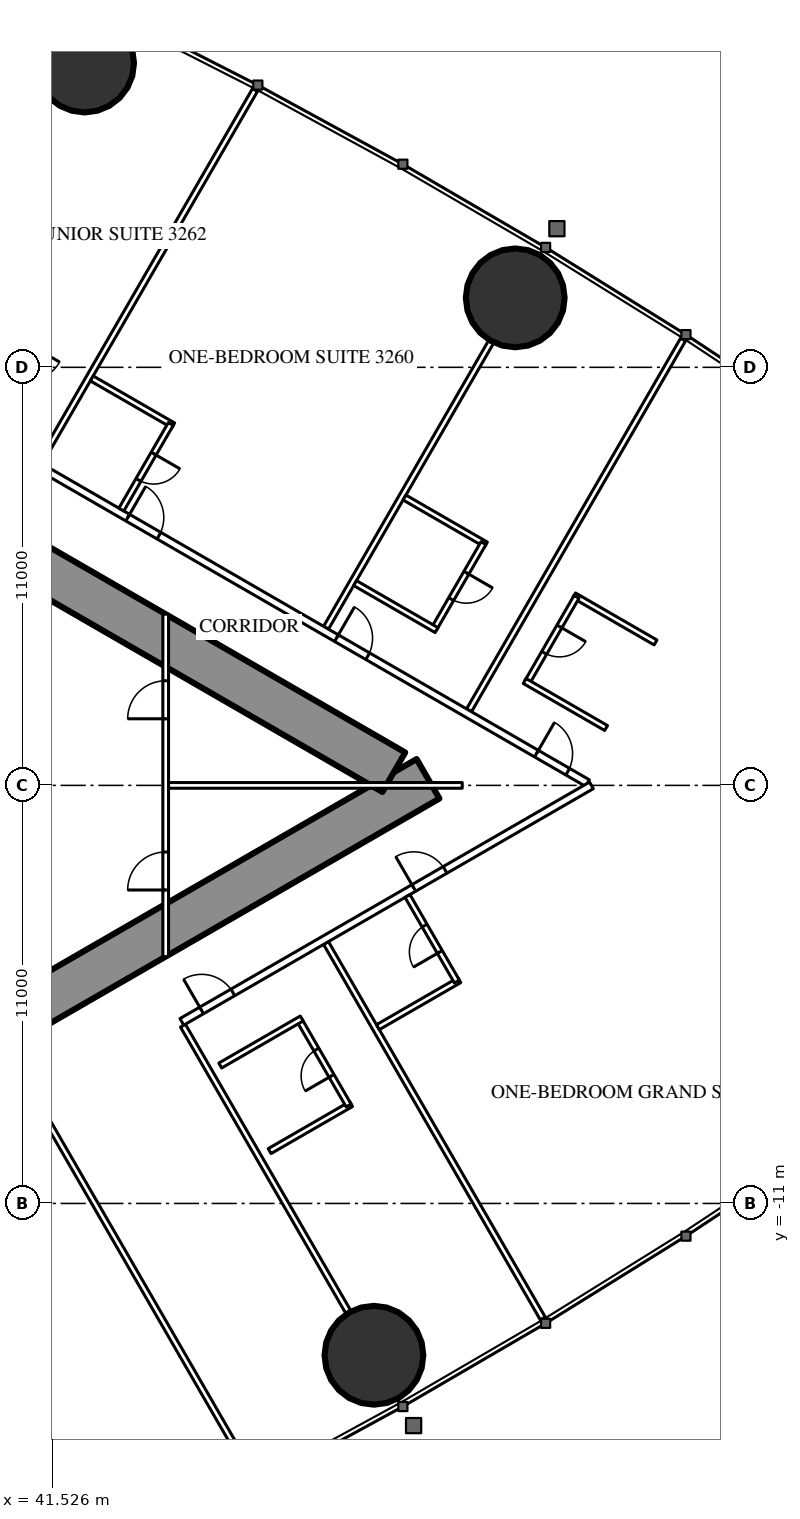
"""IFC4 building model, lengths in metres.
Left out: names, types, materials, properties, quantities, classifications, styles, units other than length and angle.
Written with IfcOpenShell. Run it as: python <this file> out.ifc"""

import sys

from ifc_helpers import new_model, si_unit, direction, frame, frame_2d, origin, origin_2d, place, context, subcontext, project, spatial, rectangle, hollow_circle, extrude, element, fill, save


model = new_model("IFC4")
c1 = context("Model", 3, precision=1e-05, world=origin(), true_north=direction((0.0, 1.0)))
c2 = subcontext(c1, "Body", "Model", "MODEL_VIEW")
j1 = project(units=[si_unit("LENGTHUNIT", "METRE"), si_unit("PLANEANGLEUNIT", "RADIAN")], contexts=[c1])
p1 = place(None, origin())
s1 = spatial("IfcSite", under=j1, at=p1, CompositionType="ELEMENT")
p2 = place(p1, origin())
s2 = spatial("IfcBuilding", under=s1, at=p2, CompositionType="ELEMENT")
p3 = place(p2, frame((0.0, 0.0, 122.1)))
s3 = spatial("IfcBuildingStorey", under=s2, at=p3, CompositionType="ELEMENT", Elevation=122.1)
for number, where, z_axis, x_axis in (
    (1, (53.697, 12.827, 0.0), (0.0, 0.0, 1.0), (1.0, 0.0, 0.0)),
    (2, (42.366, 19.007, 0.0), (0.0, 0.0, 1.0), (1.0, 0.0, 0.0)),
    (3, (49.979, -14.994, 0.0), (0.0, 0.0, 1.0), (1.0, 0.0, 0.0)),
):
    element("IfcColumn", number, at=place(p3, frame(where, z_axis=z_axis, x_axis=x_axis)), inside=s3, PredefinedType="COLUMN", context=c2, shape_type="SweptSolid", body=[
        extrude(hollow_circle(Radius=1.3, WallThickness=0.1, at=origin_2d()), origin(), (0.0, 0.0, 1.0), 3.5),
    ])
p4 = place(p3, frame((27.2, -13.8, 0.0), z_axis=(0.0, 0.0, 1.0), x_axis=(0.866027159892, 0.499996958321, 0.0)))
e4 = element("IfcWall", 4, at=p4, inside=s3, PredefinedType="SHEAR", context=c2, shape_type="SweptSolid", body=[
    extrude(rectangle(XDim=27.947, YDim=1.2, at=frame_2d((13.973, 0.0))), origin(), (0.0, 0.0, 1.0), 3.5),
])
p5 = place(p4, frame((4.6, 0.0, 0.0)))
e5 = element("IfcOpeningElement", 5, at=p5, cuts=e4, PredefinedType="OPENING", context=c2, shape_type="SweptSolid", body=[
    extrude(rectangle(XDim=1.0, YDim=2.2, at=frame_2d((0.5, 1.1))), frame((0.0, 0.61, 0.0), z_axis=(0.0, -1.0, 0.0), x_axis=(1.0, 0.0, 0.0)), (0.0, 0.0, 1.0), 1.22),
])
p6 = place(p4, frame((13.395, 0.0, 0.0)))
e6 = element("IfcOpeningElement", 6, at=p6, cuts=e4, PredefinedType="OPENING", context=c2, shape_type="SweptSolid", body=[
    extrude(rectangle(XDim=1.8, YDim=2.2, at=frame_2d((0.9, 1.1))), frame((0.0, 0.61, 0.0), z_axis=(0.0, -1.0, 0.0), x_axis=(1.0, 0.0, 0.0)), (0.0, 0.0, 1.0), 1.22),
])
p7 = place(p3, frame((27.2, 13.8, 0.0), z_axis=(0.0, 0.0, 1.0), x_axis=(0.866024515034, -0.500001539357, 0.0)))
e7 = element("IfcWall", 7, at=p7, inside=s3, PredefinedType="SHEAR", context=c2, shape_type="SweptSolid", body=[
    extrude(rectangle(XDim=26.907, YDim=1.2, at=frame_2d((13.454, 0.0))), origin(), (0.0, 0.0, 1.0), 3.5),
])
p8 = place(p7, frame((4.6, 0.0, 0.0)))
e8 = element("IfcOpeningElement", 8, at=p8, cuts=e7, PredefinedType="OPENING", context=c2, shape_type="SweptSolid", body=[
    extrude(rectangle(XDim=1.0, YDim=2.2, at=frame_2d((0.5, 1.1))), frame((0.0, 0.61, 0.0), z_axis=(0.0, -1.0, 0.0), x_axis=(1.0, 0.0, 0.0)), (0.0, 0.0, 1.0), 1.22),
])
p9 = place(p7, frame((13.395, 0.0, 0.0)))
e9 = element("IfcOpeningElement", 9, at=p9, cuts=e7, PredefinedType="OPENING", context=c2, shape_type="SweptSolid", body=[
    extrude(rectangle(XDim=1.8, YDim=2.2, at=frame_2d((0.9, 1.1))), frame((0.0, 0.61, 0.0), z_axis=(0.0, -1.0, 0.0), x_axis=(1.0, 0.0, 0.0)), (0.0, 0.0, 1.0), 1.22),
])
p10 = place(p3, frame((41.19, -8.494, 0.0), z_axis=(0.0, 0.0, 1.0), x_axis=(0.49999258054, -0.866029687369, 0.0)))
e10 = element("IfcWall", 10, at=p10, inside=s3, PredefinedType="PARTITIONING", context=c2, shape_type="SweptSolid", body=[
    extrude(rectangle(XDim=11.318, YDim=0.15, at=frame_2d((5.659, 0.0))), origin(), (0.0, 0.0, 1.0), 3.25),
])
p11 = place(p3, frame((44.954, -6.321, 0.0), z_axis=(0.0, 0.0, 1.0), x_axis=(0.500018676722, -0.866014620505, 0.0)))
e11 = element("IfcWall", 11, at=p11, inside=s3, PredefinedType="PARTITIONING", context=c2, shape_type="SweptSolid", body=[
    extrude(rectangle(XDim=8.704, YDim=0.15, at=frame_2d((4.352, 0.0))), origin(), (0.0, 0.0, 1.0), 2.2),
])
p12 = place(p3, frame((48.719, -4.147, 0.0), z_axis=(0.0, 0.0, 1.0), x_axis=(0.499990498062, -0.866030889661, 0.0)))
e12 = element("IfcWall", 12, at=p12, inside=s3, PredefinedType="PARTITIONING", context=c2, shape_type="SweptSolid", body=[
    extrude(rectangle(XDim=11.406, YDim=0.15, at=frame_2d((5.703, 0.0))), origin(), (0.0, 0.0, 1.0), 3.25),
])
p13 = place(p3, frame((41.19, 8.494, 0.0), z_axis=(0.0, 0.0, 1.0), x_axis=(0.49999258054, 0.866029687369, 0.0)))
e13 = element("IfcWall", 13, at=p13, inside=s3, PredefinedType="PARTITIONING", context=c2, shape_type="SweptSolid", body=[
    extrude(rectangle(XDim=11.318, YDim=0.15, at=frame_2d((5.659, 0.0))), origin(), (0.0, 0.0, 1.0), 3.25),
])
p14 = place(p3, frame((48.719, 4.147, 0.0), z_axis=(0.0, 0.0, 1.0), x_axis=(0.499993328235, 0.866029255696, 0.0)))
e14 = element("IfcWall", 14, at=p14, inside=s3, PredefinedType="PARTITIONING", context=c2, shape_type="SweptSolid", body=[
    extrude(rectangle(XDim=8.686, YDim=0.15, at=frame_2d((4.343, 0.0))), origin(), (0.0, 0.0, 1.0), 2.2),
])
p15 = place(p3, frame((52.481, 1.975, 0.0), z_axis=(0.0, 0.0, 1.0), x_axis=(0.500003867771, 0.866023170714, 0.0)))
e15 = element("IfcWall", 15, at=p15, inside=s3, PredefinedType="PARTITIONING", context=c2, shape_type="SweptSolid", body=[
    extrude(rectangle(XDim=11.265, YDim=0.15, at=frame_2d((5.632, 0.0))), origin(), (0.0, 0.0, 1.0), 3.25),
])
p16 = place(p3, frame((40.105, -15.299, 0.0), z_axis=(0.0, 0.0, 1.0), x_axis=(0.499978822259, -0.866037630414, 0.0)))
e16 = element("IfcWall", 16, at=p16, inside=s3, PredefinedType="PARTITIONING", context=c2, shape_type="SweptSolid", body=[
    extrude(rectangle(XDim=3.023, YDim=0.15, at=frame_2d((1.511, 0.0))), origin(), (0.0, 0.0, 1.0), 3.25),
])
p17 = place(p3, frame((36.834, 10.894, 0.0), z_axis=(0.0, 0.0, 1.0), x_axis=(0.866028157229, -0.499995230863, 0.0)))
e17 = element("IfcWall", 17, at=p17, inside=s3, PredefinedType="PARTITIONING", context=c2, shape_type="SweptSolid", body=[
    extrude(rectangle(XDim=21.667, YDim=0.2, at=frame_2d((10.833, 0.0))), origin(), (0.0, 0.0, 1.0), 3.25),
])
p18 = place(p17, frame((20.117, 0.0, 0.0)))
e18 = element("IfcOpeningElement", 18, at=p18, cuts=e17, PredefinedType="OPENING", context=c2, shape_type="SweptSolid", body=[
    extrude(rectangle(XDim=0.95, YDim=2.2, at=frame_2d((0.475, 1.1))), frame((0.0, 0.11, 0.0), z_axis=(0.0, -1.0, 0.0), x_axis=(1.0, 0.0, 0.0)), (0.0, 0.0, 1.0), 0.22),
])
p19 = place(p17, frame((14.04, 0.0, 0.0)))
e19 = element("IfcOpeningElement", 19, at=p19, cuts=e17, PredefinedType="OPENING", context=c2, shape_type="SweptSolid", body=[
    extrude(rectangle(XDim=0.95, YDim=2.2, at=frame_2d((0.475, 1.1))), frame((0.0, 0.11, 0.0), z_axis=(0.0, -1.0, 0.0), x_axis=(1.0, 0.0, 0.0)), (0.0, 0.0, 1.0), 0.22),
])
p20 = place(p17, frame((7.697, 0.0, 0.0)))
e20 = element("IfcOpeningElement", 20, at=p20, cuts=e17, PredefinedType="OPENING", context=c2, shape_type="SweptSolid", body=[
    extrude(rectangle(XDim=0.95, YDim=2.2, at=frame_2d((0.475, 1.1))), frame((0.0, 0.11, 0.0), z_axis=(0.0, -1.0, 0.0), x_axis=(1.0, 0.0, 0.0)), (0.0, 0.0, 1.0), 0.22),
])
p21 = place(p17, frame((3.35, 0.0, 0.0)))
e21 = element("IfcOpeningElement", 21, at=p21, cuts=e17, PredefinedType="OPENING", context=c2, shape_type="SweptSolid", body=[
    extrude(rectangle(XDim=1.0, YDim=2.2, at=frame_2d((0.5, 1.1))), frame((0.0, 0.11, 0.0), z_axis=(0.0, -1.0, 0.0), x_axis=(1.0, 0.0, 0.0)), (0.0, 0.0, 1.0), 0.22),
])
p22 = place(p3, frame((44.925, -6.222, 0.0), z_axis=(0.0, 0.0, 1.0), x_axis=(0.866020269055, 0.500008893506, 0.0)))
e22 = element("IfcWall", 22, at=p22, inside=s3, PredefinedType="PARTITIONING", context=c2, shape_type="SweptSolid", body=[
    extrude(rectangle(XDim=12.444, YDim=0.2, at=frame_2d((6.222, 0.0))), origin(), (0.0, 0.0, 1.0), 3.25),
])
p23 = place(p22, frame((0.6, 0.0, 0.0)))
e23 = element("IfcOpeningElement", 23, at=p23, cuts=e22, PredefinedType="OPENING", context=c2, shape_type="SweptSolid", body=[
    extrude(rectangle(XDim=0.95, YDim=2.2, at=frame_2d((0.475, 1.1))), frame((0.0, 0.11, 0.0), z_axis=(0.0, -1.0, 0.0), x_axis=(1.0, 0.0, 0.0)), (0.0, 0.0, 1.0), 0.22),
])
p24 = place(p22, frame((7.047, 0.0, 0.0)))
e24 = element("IfcOpeningElement", 24, at=p24, cuts=e22, PredefinedType="OPENING", context=c2, shape_type="SweptSolid", body=[
    extrude(rectangle(XDim=0.95, YDim=2.2, at=frame_2d((0.475, 1.1))), frame((0.0, 0.11, 0.0), z_axis=(0.0, -1.0, 0.0), x_axis=(1.0, 0.0, 0.0)), (0.0, 0.0, 1.0), 0.22),
])
p25 = place(p3, frame((47.235, -9.623, 0.0), z_axis=(0.0, 0.0, 1.0), x_axis=(0.866006523861, 0.500032699561, 0.0)))
e25 = element("IfcWall", 25, at=p25, inside=s3, PredefinedType="PARTITIONING", context=c2, shape_type="SweptSolid", body=[
    extrude(rectangle(XDim=2.475, YDim=0.15, at=frame_2d((1.237, 0.0))), origin(), (0.0, 0.0, 1.0), 3.25),
])
p26 = place(p3, frame((48.013, -6.171, 0.0), z_axis=(0.0, 0.0, 1.0), x_axis=(0.500006934395, -0.866021400173, 0.0)))
e26 = element("IfcWall", 26, at=p26, inside=s3, PredefinedType="PARTITIONING", context=c2, shape_type="SweptSolid", body=[
    extrude(rectangle(XDim=2.6, YDim=0.15, at=frame_2d((1.3, 0.0))), origin(), (0.0, 0.0, 1.0), 3.25),
])
p27 = place(p26, frame((0.9, 0.0, 0.0)))
e27 = element("IfcOpeningElement", 27, at=p27, cuts=e26, PredefinedType="OPENING", context=c2, shape_type="SweptSolid", body=[
    extrude(rectangle(XDim=0.8, YDim=2.2, at=frame_2d((0.4, 1.1))), frame((0.0, 0.085, 0.0), z_axis=(0.0, -1.0, 0.0), x_axis=(1.0, 0.0, 0.0)), (0.0, 0.0, 1.0), 0.17),
])
p28 = place(p3, frame((45.935, -7.371, 0.0), z_axis=(0.0, 0.0, 1.0), x_axis=(0.866031185235, 0.4999899861, 0.0)))
e28 = element("IfcWall", 28, at=p28, inside=s3, PredefinedType="PARTITIONING", context=c2, shape_type="SweptSolid", body=[
    extrude(rectangle(XDim=2.475, YDim=0.15, at=frame_2d((1.238, 0.0))), origin(), (0.0, 0.0, 1.0), 3.25),
])
p29 = place(p3, frame((50.083, -6.362, 0.0), z_axis=(0.0, 0.0, 1.0), x_axis=(0.866006523861, 0.500032699561, 0.0)))
e29 = element("IfcWall", 29, at=p29, inside=s3, PredefinedType="PARTITIONING", context=c2, shape_type="SweptSolid", body=[
    extrude(rectangle(XDim=2.475, YDim=0.15, at=frame_2d((1.237, 0.0))), origin(), (0.0, 0.0, 1.0), 3.25),
])
p30 = place(p3, frame((50.862, -2.91, 0.0), z_axis=(0.0, 0.0, 1.0), x_axis=(0.500047596559, -0.865997922154, 0.0)))
e30 = element("IfcWall", 30, at=p30, inside=s3, PredefinedType="PARTITIONING", context=c2, shape_type="SweptSolid", body=[
    extrude(rectangle(XDim=2.6, YDim=0.15, at=frame_2d((1.3, 0.0))), origin(), (0.0, 0.0, 1.0), 3.25),
])
p31 = place(p30, frame((0.9, 0.0, 0.0)))
e31 = element("IfcOpeningElement", 31, at=p31, cuts=e30, PredefinedType="OPENING", context=c2, shape_type="SweptSolid", body=[
    extrude(rectangle(XDim=0.8, YDim=2.2, at=frame_2d((0.4, 1.1))), frame((0.0, 0.085, 0.0), z_axis=(0.0, -1.0, 0.0), x_axis=(1.0, 0.0, 0.0)), (0.0, 0.0, 1.0), 0.17),
])
p32 = place(p3, frame((55.245, 4.998, 0.0), z_axis=(0.0, 0.0, 1.0), x_axis=(0.866006523861, -0.500032699561, 0.0)))
e32 = element("IfcWall", 32, at=p32, inside=s3, PredefinedType="PARTITIONING", context=c2, shape_type="SweptSolid", body=[
    extrude(rectangle(XDim=2.475, YDim=0.15, at=frame_2d((1.237, 0.0))), origin(), (0.0, 0.0, 1.0), 3.25),
])
p33 = place(p3, frame((54.01, 2.709, 0.0), z_axis=(0.0, 0.0, 1.0), x_axis=(0.500006934395, 0.866021400173, 0.0)))
e33 = element("IfcWall", 33, at=p33, inside=s3, PredefinedType="PARTITIONING", context=c2, shape_type="SweptSolid", body=[
    extrude(rectangle(XDim=2.6, YDim=0.15, at=frame_2d((1.3, 0.0))), origin(), (0.0, 0.0, 1.0), 3.25),
])
p34 = place(p33, frame((0.9, 0.0, 0.0)))
e34 = element("IfcOpeningElement", 34, at=p34, cuts=e33, PredefinedType="OPENING", context=c2, shape_type="SweptSolid", body=[
    extrude(rectangle(XDim=0.8, YDim=2.2, at=frame_2d((0.4, 1.1))), frame((0.0, 0.085, 0.0), z_axis=(0.0, -1.0, 0.0), x_axis=(1.0, 0.0, 0.0)), (0.0, 0.0, 1.0), 0.17),
])
p35 = place(p3, frame((53.945, 2.747, 0.0), z_axis=(0.0, 0.0, 1.0), x_axis=(0.866031185235, -0.4999899861, 0.0)))
e35 = element("IfcWall", 35, at=p35, inside=s3, PredefinedType="PARTITIONING", context=c2, shape_type="SweptSolid", body=[
    extrude(rectangle(XDim=2.475, YDim=0.15, at=frame_2d((1.238, 0.0))), origin(), (0.0, 0.0, 1.0), 3.25),
])
p36 = place(p3, frame((50.783, 7.574, 0.0), z_axis=(0.0, 0.0, 1.0), x_axis=(0.866006523861, -0.500032699561, 0.0)))
e36 = element("IfcWall", 36, at=p36, inside=s3, PredefinedType="PARTITIONING", context=c2, shape_type="SweptSolid", body=[
    extrude(rectangle(XDim=2.475, YDim=0.15, at=frame_2d((1.237, 0.0))), origin(), (0.0, 0.0, 1.0), 3.25),
])
p37 = place(p3, frame((51.562, 4.123, 0.0), z_axis=(0.0, 0.0, 1.0), x_axis=(0.49997716683, 0.86603858612, 0.0)))
e37 = element("IfcWall", 37, at=p37, inside=s3, PredefinedType="PARTITIONING", context=c2, shape_type="SweptSolid", body=[
    extrude(rectangle(XDim=2.6, YDim=0.15, at=frame_2d((1.3, 0.0))), origin(), (0.0, 0.0, 1.0), 3.25),
])
p38 = place(p37, frame((0.9, 0.0, 0.0)))
e38 = element("IfcOpeningElement", 38, at=p38, cuts=e37, PredefinedType="OPENING", context=c2, shape_type="SweptSolid", body=[
    extrude(rectangle(XDim=0.8, YDim=2.2, at=frame_2d((0.4, 1.1))), frame((0.0, 0.085, 0.0), z_axis=(0.0, -1.0, 0.0), x_axis=(1.0, 0.0, 0.0)), (0.0, 0.0, 1.0), 0.17),
])
for number, where, z_axis, x_axis in (
    (39, (49.483, 5.323, 0.0), (0.0, 0.0, 1.0), (0.866, -0.5, 0.0)),
    (40, (42.555, 10.708, 0.0), (0.0, 0.0, 1.0), (0.866, -0.5, 0.0)),
):
    element("IfcWall", number, at=place(p3, frame(where, z_axis=z_axis, x_axis=x_axis)), inside=s3, PredefinedType="PARTITIONING", context=c2, shape_type="SweptSolid", body=[
        extrude(rectangle(XDim=2.475, YDim=0.15, at=frame_2d((1.238, 0.0))), origin(), (0.0, 0.0, 1.0), 3.25),
    ])
p39 = place(p3, frame((43.333, 7.257, 0.0), z_axis=(0.0, 0.0, 1.0), x_axis=(0.500006934395, 0.866021400173, 0.0)))
e41 = element("IfcWall", 41, at=p39, inside=s3, PredefinedType="PARTITIONING", context=c2, shape_type="SweptSolid", body=[
    extrude(rectangle(XDim=2.6, YDim=0.15, at=frame_2d((1.3, 0.0))), origin(), (0.0, 0.0, 1.0), 3.25),
])
p40 = place(p39, frame((0.9, 0.0, 0.0)))
e42 = element("IfcOpeningElement", 42, at=p40, cuts=e41, PredefinedType="OPENING", context=c2, shape_type="SweptSolid", body=[
    extrude(rectangle(XDim=0.8, YDim=2.2, at=frame_2d((0.4, 1.1))), frame((0.0, 0.085, 0.0), z_axis=(0.0, -1.0, 0.0), x_axis=(1.0, 0.0, 0.0)), (0.0, 0.0, 1.0), 0.17),
])
p41 = place(p3, frame((44.5, -4.505, 0.0), z_axis=(0.0, 0.0, 1.0), x_axis=(0.0, 1.0, 0.0)))
e43 = element("IfcWall", 43, at=p41, inside=s3, PredefinedType="PARTITIONING", context=c2, shape_type="SweptSolid", body=[
    extrude(rectangle(XDim=9.009, YDim=0.15, at=frame_2d((4.505, 0.0))), origin(), (0.0, 0.0, 1.0), 2.45),
])
p42 = place(p41, frame((1.752, 0.0, 0.0)))
e44 = element("IfcOpeningElement", 44, at=p42, cuts=e43, PredefinedType="OPENING", context=c2, shape_type="SweptSolid", body=[
    extrude(rectangle(XDim=1.0, YDim=2.2, at=frame_2d((0.5, 1.1))), frame((0.0, 0.085, 0.0), z_axis=(0.0, -1.0, 0.0), x_axis=(1.0, 0.0, 0.0)), (0.0, 0.0, 1.0), 0.17),
])
p43 = place(p41, frame((6.257, 0.0, 0.0)))
e45 = element("IfcOpeningElement", 45, at=p43, cuts=e43, PredefinedType="OPENING", context=c2, shape_type="SweptSolid", body=[
    extrude(rectangle(XDim=1.0, YDim=2.2, at=frame_2d((0.5, 1.1))), frame((0.0, 0.085, 0.0), z_axis=(0.0, -1.0, 0.0), x_axis=(1.0, 0.0, 0.0)), (0.0, 0.0, 1.0), 0.17),
])
p44 = place(p3, frame((44.575, 0.0, 0.0), z_axis=(0.0, 0.0, 1.0), x_axis=(1.0, 0.0, 0.0)))
e46 = element("IfcWall", 46, at=p44, inside=s3, PredefinedType="PARTITIONING", context=c2, shape_type="SweptSolid", body=[
    extrude(rectangle(XDim=7.727, YDim=0.15, at=frame_2d((3.864, 0.0))), origin(), (0.0, 0.0, 1.0), 2.2),
])
p45 = place(p27, origin())
e47 = element("IfcDoor", 47, at=p45, inside=s3, OperationType="SINGLE_SWING_RIGHT", PredefinedType="DOOR", context=c2, shape_type="SweptSolid", body=[
    extrude(rectangle(XDim=0.8, YDim=2.2, at=frame_2d((0.4, 1.1))), frame((0.0, 0.025, 0.0), z_axis=(0.0, -1.0, 0.0), x_axis=(1.0, 0.0, 0.0)), (0.0, 0.0, 1.0), 0.05),
])
fill(e27, e47)
p46 = place(p23, origin())
e48 = element("IfcDoor", 48, at=p46, inside=s3, OperationType="SINGLE_SWING_LEFT", PredefinedType="DOOR", context=c2, shape_type="SweptSolid", body=[
    extrude(rectangle(XDim=0.95, YDim=2.2, at=frame_2d((0.475, 1.1))), frame((0.0, 0.025, 0.0), z_axis=(0.0, -1.0, 0.0), x_axis=(1.0, 0.0, 0.0)), (0.0, 0.0, 1.0), 0.05),
])
fill(e23, e48)
p47 = place(p31, origin())
e49 = element("IfcDoor", 49, at=p47, inside=s3, OperationType="SINGLE_SWING_RIGHT", PredefinedType="DOOR", context=c2, shape_type="SweptSolid", body=[
    extrude(rectangle(XDim=0.8, YDim=2.2, at=frame_2d((0.4, 1.1))), frame((0.0, 0.025, 0.0), z_axis=(0.0, -1.0, 0.0), x_axis=(1.0, 0.0, 0.0)), (0.0, 0.0, 1.0), 0.05),
])
fill(e31, e49)
p48 = place(p24, origin())
e50 = element("IfcDoor", 50, at=p48, inside=s3, OperationType="SINGLE_SWING_LEFT", PredefinedType="DOOR", context=c2, shape_type="SweptSolid", body=[
    extrude(rectangle(XDim=0.95, YDim=2.2, at=frame_2d((0.475, 1.1))), frame((0.0, 0.025, 0.0), z_axis=(0.0, -1.0, 0.0), x_axis=(1.0, 0.0, 0.0)), (0.0, 0.0, 1.0), 0.05),
])
fill(e24, e50)
p49 = place(p34, origin())
e51 = element("IfcDoor", 51, at=p49, inside=s3, OperationType="SINGLE_SWING_RIGHT", PredefinedType="DOOR", context=c2, shape_type="SweptSolid", body=[
    extrude(rectangle(XDim=0.8, YDim=2.2, at=frame_2d((0.4, 1.1))), frame((0.0, 0.025, 0.0), z_axis=(0.0, -1.0, 0.0), x_axis=(1.0, 0.0, 0.0)), (0.0, 0.0, 1.0), 0.05),
])
fill(e34, e51)
p50 = place(p18, origin())
e52 = element("IfcDoor", 52, at=p50, inside=s3, OperationType="SINGLE_SWING_LEFT", PredefinedType="DOOR", context=c2, shape_type="SweptSolid", body=[
    extrude(rectangle(XDim=0.95, YDim=2.2, at=frame_2d((0.475, 1.1))), frame((0.0, 0.025, 0.0), z_axis=(0.0, -1.0, 0.0), x_axis=(1.0, 0.0, 0.0)), (0.0, 0.0, 1.0), 0.05),
])
fill(e18, e52)
p51 = place(p38, origin())
e53 = element("IfcDoor", 53, at=p51, inside=s3, OperationType="SINGLE_SWING_RIGHT", PredefinedType="DOOR", context=c2, shape_type="SweptSolid", body=[
    extrude(rectangle(XDim=0.8, YDim=2.2, at=frame_2d((0.4, 1.1))), frame((0.0, 0.025, 0.0), z_axis=(0.0, -1.0, 0.0), x_axis=(1.0, 0.0, 0.0)), (0.0, 0.0, 1.0), 0.05),
])
fill(e38, e53)
p52 = place(p19, origin())
e54 = element("IfcDoor", 54, at=p52, inside=s3, OperationType="SINGLE_SWING_LEFT", PredefinedType="DOOR", context=c2, shape_type="SweptSolid", body=[
    extrude(rectangle(XDim=0.95, YDim=2.2, at=frame_2d((0.475, 1.1))), frame((0.0, 0.025, 0.0), z_axis=(0.0, -1.0, 0.0), x_axis=(1.0, 0.0, 0.0)), (0.0, 0.0, 1.0), 0.05),
])
fill(e19, e54)
p53 = place(p40, origin())
e55 = element("IfcDoor", 55, at=p53, inside=s3, OperationType="SINGLE_SWING_RIGHT", PredefinedType="DOOR", context=c2, shape_type="SweptSolid", body=[
    extrude(rectangle(XDim=0.8, YDim=2.2, at=frame_2d((0.4, 1.1))), frame((0.0, 0.025, 0.0), z_axis=(0.0, -1.0, 0.0), x_axis=(1.0, 0.0, 0.0)), (0.0, 0.0, 1.0), 0.05),
])
fill(e42, e55)
p54 = place(p20, origin())
e56 = element("IfcDoor", 56, at=p54, inside=s3, OperationType="SINGLE_SWING_LEFT", PredefinedType="DOOR", context=c2, shape_type="SweptSolid", body=[
    extrude(rectangle(XDim=0.95, YDim=2.2, at=frame_2d((0.475, 1.1))), frame((0.0, 0.025, 0.0), z_axis=(0.0, -1.0, 0.0), x_axis=(1.0, 0.0, 0.0)), (0.0, 0.0, 1.0), 0.05),
])
fill(e20, e56)
p55 = place(p42, origin())
e57 = element("IfcDoor", 57, at=p55, inside=s3, OperationType="SINGLE_SWING_LEFT", PredefinedType="DOOR", context=c2, shape_type="SweptSolid", body=[
    extrude(rectangle(XDim=1.0, YDim=2.2, at=frame_2d((0.5, 1.1))), frame((0.0, 0.025, 0.0), z_axis=(0.0, -1.0, 0.0), x_axis=(1.0, 0.0, 0.0)), (0.0, 0.0, 1.0), 0.05),
])
fill(e44, e57)
p56 = place(p43, origin())
e58 = element("IfcDoor", 58, at=p56, inside=s3, OperationType="SINGLE_SWING_LEFT", PredefinedType="DOOR", context=c2, shape_type="SweptSolid", body=[
    extrude(rectangle(XDim=1.0, YDim=2.2, at=frame_2d((0.5, 1.1))), frame((0.0, 0.025, 0.0), z_axis=(0.0, -1.0, 0.0), x_axis=(1.0, 0.0, 0.0)), (0.0, 0.0, 1.0), 0.05),
])
fill(e45, e58)
save(model, sys.argv[1])
